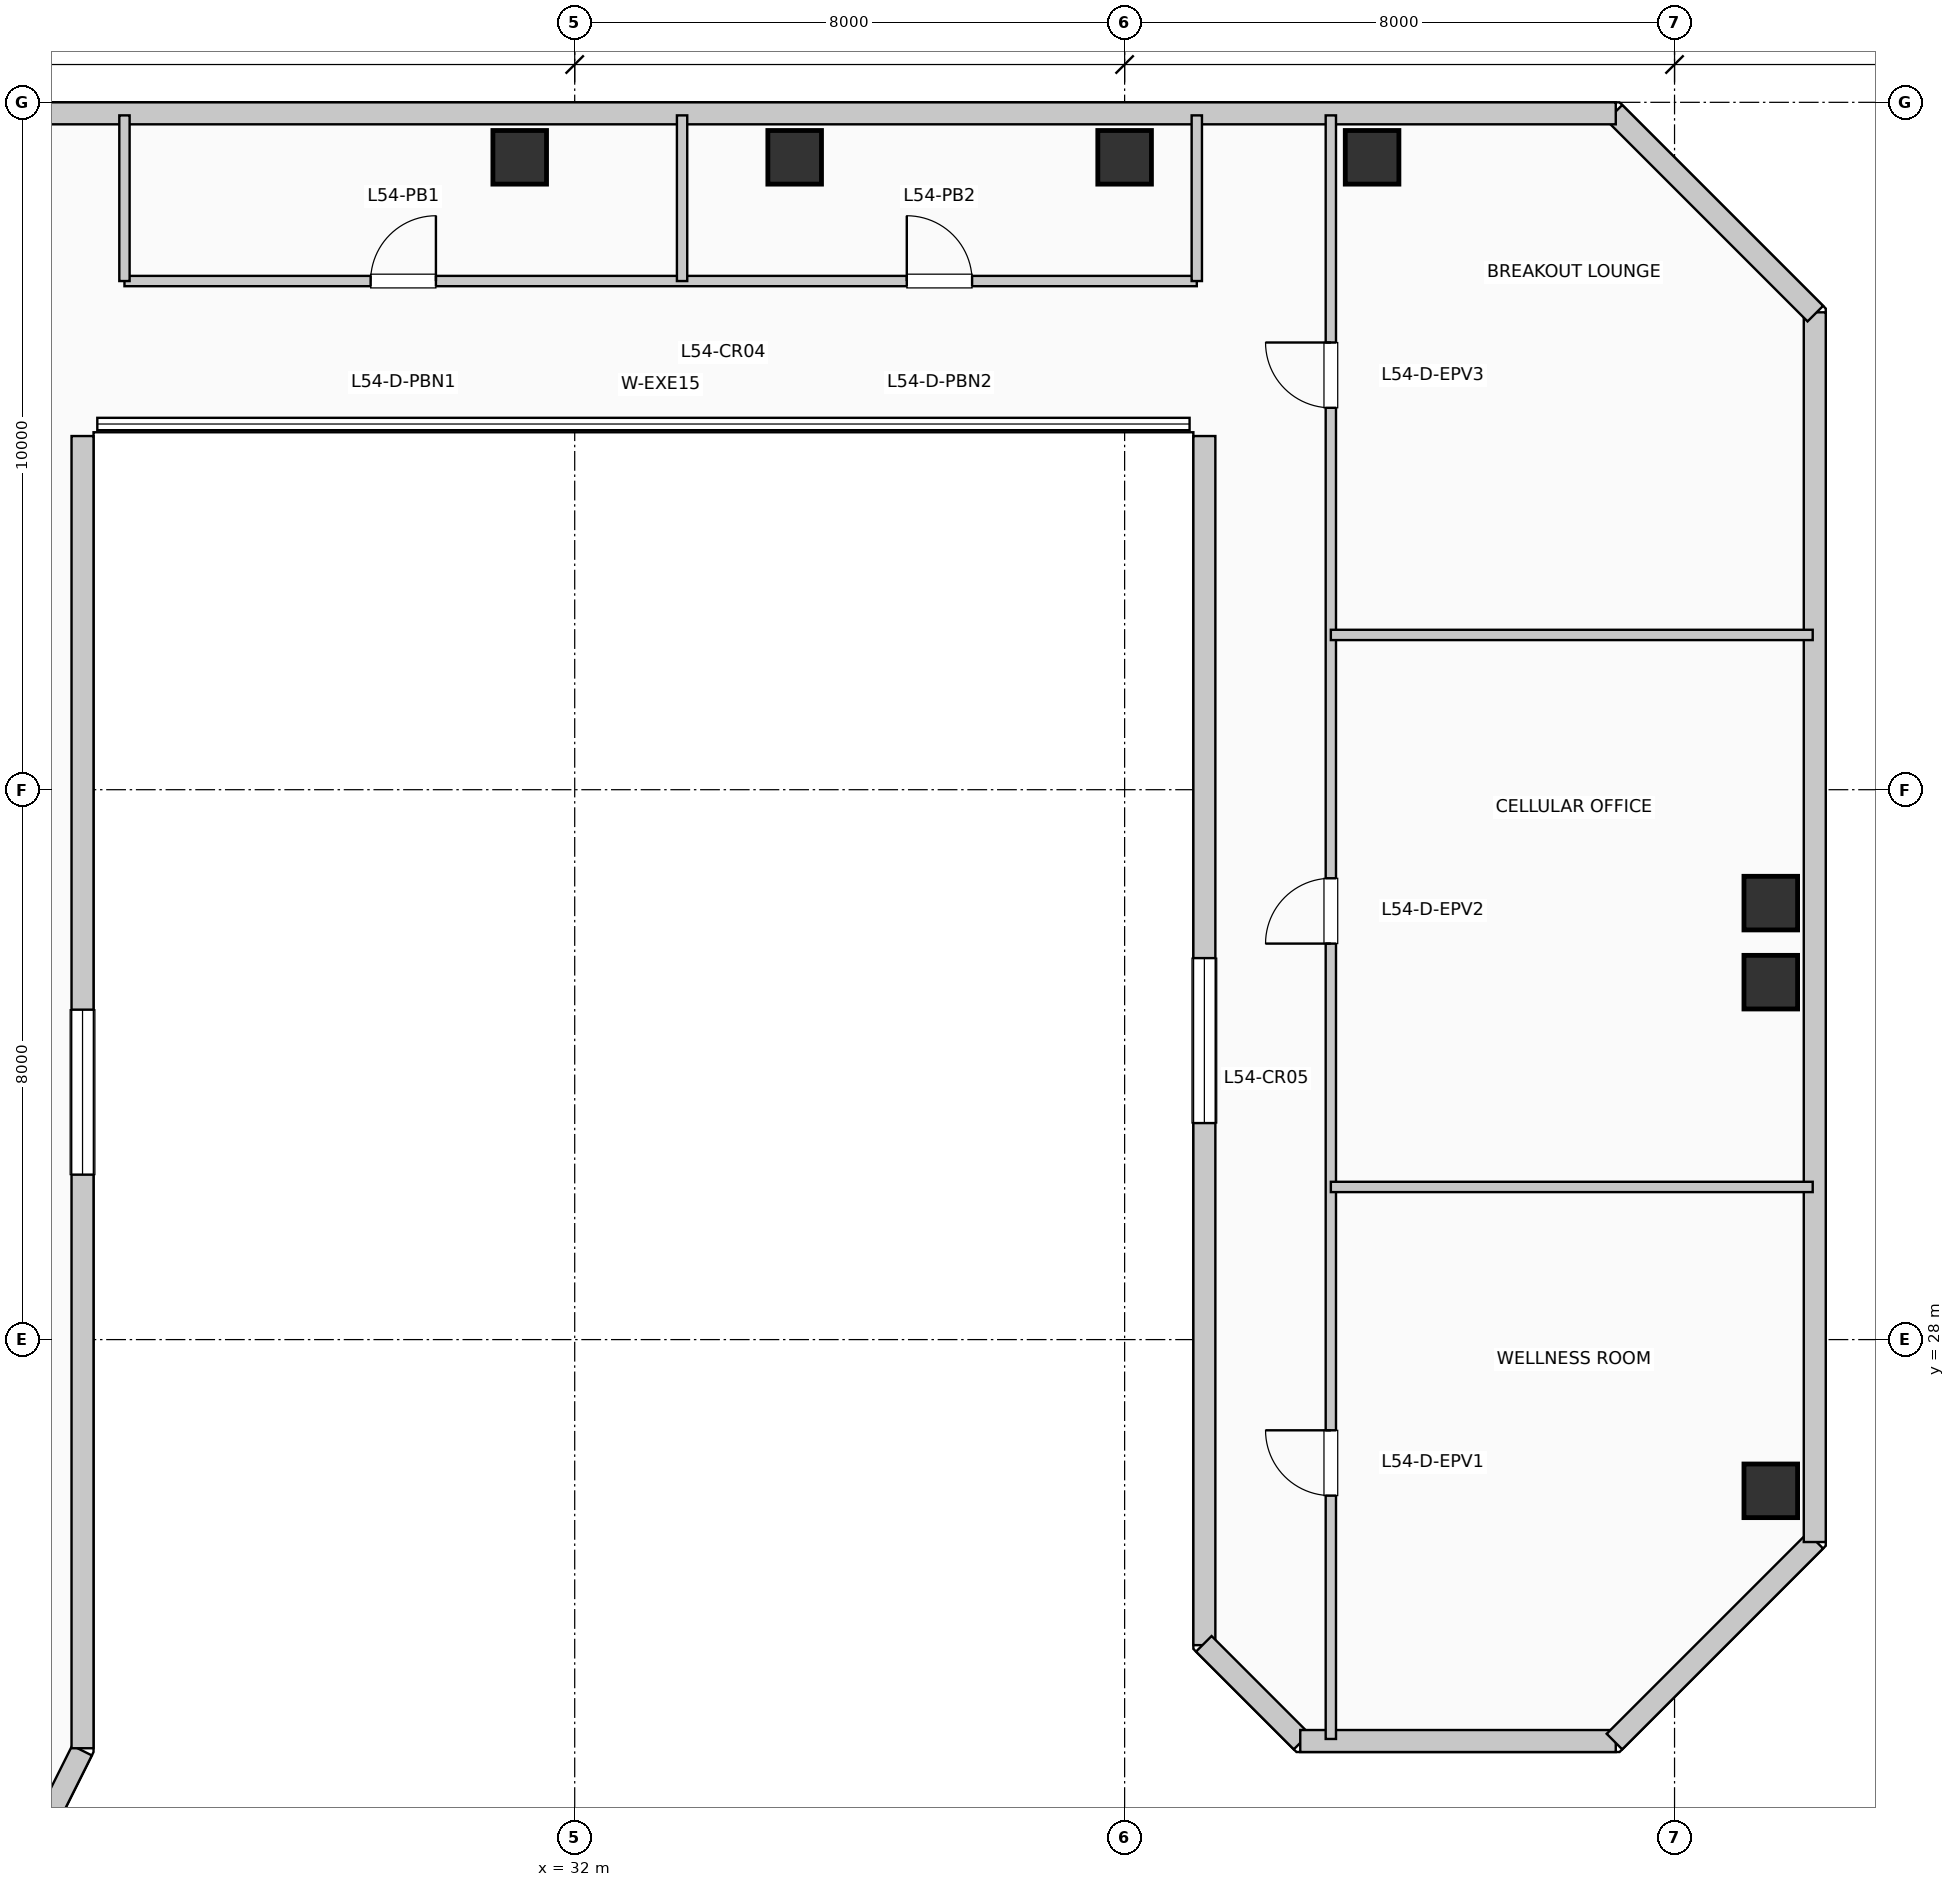
"""IFC4 building model, lengths in metres.
Left out: names, types, materials, properties, quantities, classifications, styles, units other than length and angle.
Written with IfcOpenShell. Run it as: python <this file> out.ifc"""

import sys

from ifc_helpers import new_model, si_unit, direction, frame, frame_2d, origin, origin_2d, place, context, subcontext, project, spatial, rectangle, extrude, element, fill, save


model = new_model("IFC4")
c1 = context("Model", 3, precision=1e-05, world=origin(), true_north=direction((0.0, 1.0)))
c2 = subcontext(c1, "Body", "Model", "MODEL_VIEW")
j1 = project(units=[si_unit("LENGTHUNIT", "METRE"), si_unit("PLANEANGLEUNIT", "RADIAN")], contexts=[c1])
p1 = place(None, origin())
s1 = spatial("IfcSite", under=j1, at=p1, CompositionType="ELEMENT")
p2 = place(p1, origin())
s2 = spatial("IfcBuilding", under=s1, at=p2, CompositionType="ELEMENT")
p3 = place(p2, frame((0.0, 0.0, 223.74)))
s3 = spatial("IfcBuildingStorey", under=s2, at=p3, CompositionType="ELEMENT", Elevation=223.74)
for number, where, z_axis, x_axis in (
    (1, (31.2, 45.2, 0.0), (0.0, 0.0, 1.0), (1.0, 0.0, 0.0)),
    (2, (35.2, 45.2, 0.0), (0.0, 0.0, 1.0), (1.0, 0.0, 0.0)),
    (3, (40.0, 45.2, 0.0), (0.0, 0.0, 1.0), (1.0, 0.0, 0.0)),
    (4, (43.6, 45.2, 0.0), (0.0, 0.0, 1.0), (1.0, 0.0, 0.0)),
    (5, (49.4, 25.8, 0.0), (0.0, 0.0, 1.0), (1.0, 0.0, 0.0)),
    (6, (49.4, 33.2, 0.0), (0.0, 0.0, 1.0), (1.0, 0.0, 0.0)),
    (7, (49.4, 34.35, 0.0), (0.0, 0.0, 1.0), (1.0, 0.0, 0.0)),
):
    element("IfcColumn", number, at=place(p3, frame(where, z_axis=z_axis, x_axis=x_axis)), inside=s3, PredefinedType="COLUMN", context=c2, shape_type="SweptSolid", body=[
        extrude(rectangle(XDim=0.78, YDim=0.78, at=origin_2d()), origin(), (0.0, 0.0, 1.0), 3.96),
    ])
p4 = place(p3, frame((23.882, 20.121, 0.0), z_axis=(0.0, 0.0, 1.0), x_axis=(0.447121734542, 0.894473115583, 0.0)))
e8 = element("IfcWall", 8, at=p4, inside=s3, PredefinedType="SOLIDWALL", context=c2, shape_type="SweptSolid", body=[
    extrude(rectangle(XDim=2.126, YDim=0.32, at=frame_2d((1.063, 0.0))), origin(), (0.0, 0.0, 1.0), 3.71),
])
p5 = place(p3, frame((24.84, 22.055, 0.0), z_axis=(0.0, 0.0, 1.0), x_axis=(0.0, 1.0, 0.0)))
e9 = element("IfcWall", 9, at=p5, inside=s3, PredefinedType="SOLIDWALL", context=c2, shape_type="SweptSolid", body=[
    extrude(rectangle(XDim=19.09, YDim=0.32, at=frame_2d((9.545, 0.0))), origin(), (0.0, 0.0, 1.0), 3.71),
])
p6 = place(p5, frame((8.345, 0.0, 0.85)))
e10 = element("IfcOpeningElement", 10, at=p6, cuts=e9, PredefinedType="OPENING", context=c2, shape_type="SweptSolid", body=[
    extrude(rectangle(XDim=2.4, YDim=2.05, at=frame_2d((1.2, 1.025))), frame((0.0, 0.17, 0.0), z_axis=(0.0, -1.0, 0.0), x_axis=(1.0, 0.0, 0.0)), (0.0, 0.0, 1.0), 0.34),
])
p7 = place(p3, frame((41.16, 41.145, 0.0), z_axis=(0.0, 0.0, 1.0), x_axis=(0.0, -1.0, 0.0)))
e11 = element("IfcWall", 11, at=p7, inside=s3, PredefinedType="SOLIDWALL", context=c2, shape_type="SweptSolid", body=[
    extrude(rectangle(XDim=17.59, YDim=0.32, at=frame_2d((8.795, 0.0))), origin(), (0.0, 0.0, 1.0), 3.71),
])
p8 = place(p7, frame((7.595, 0.0, 0.85)))
e12 = element("IfcOpeningElement", 12, at=p8, cuts=e11, PredefinedType="OPENING", context=c2, shape_type="SweptSolid", body=[
    extrude(rectangle(XDim=2.4, YDim=2.05, at=frame_2d((1.2, 1.025))), frame((0.0, 0.17, 0.0), z_axis=(0.0, -1.0, 0.0), x_axis=(1.0, 0.0, 0.0)), (0.0, 0.0, 1.0), 0.34),
])
p9 = place(p3, frame((41.152, 23.574, 0.0), z_axis=(0.0, 0.0, 1.0), x_axis=(0.707106781187, -0.707106781187, 0.0)))
e13 = element("IfcWall", 13, at=p9, inside=s3, PredefinedType="SOLIDWALL", context=c2, shape_type="SweptSolid", body=[
    extrude(rectangle(XDim=2.011, YDim=0.32, at=frame_2d((1.006, 0.0))), origin(), (0.0, 0.0, 1.0), 3.71),
])
p10 = place(p3, frame((42.555, 22.16, 0.0), z_axis=(0.0, 0.0, 1.0), x_axis=(1.0, 0.0, 0.0)))
e14 = element("IfcWall", 14, at=p10, inside=s3, PredefinedType="SOLIDWALL", context=c2, shape_type="SweptSolid", body=[
    extrude(rectangle(XDim=4.59, YDim=0.32, at=frame_2d((2.295, 0.0))), origin(), (0.0, 0.0, 1.0), 3.71),
])
p11 = place(p3, frame((47.126, 22.152, 0.0), z_axis=(0.0, 0.0, 1.0), x_axis=(0.707136318428, 0.707077242712, 0.0)))
e15 = element("IfcWall", 15, at=p11, inside=s3, PredefinedType="SOLIDWALL", context=c2, shape_type="SweptSolid", body=[
    extrude(rectangle(XDim=4.133, YDim=0.32, at=frame_2d((2.066, 0.0))), origin(), (0.0, 0.0, 1.0), 3.71),
])
p12 = place(p3, frame((50.04, 25.055, 0.0), z_axis=(0.0, 0.0, 1.0), x_axis=(0.0, 1.0, 0.0)))
e16 = element("IfcWall", 16, at=p12, inside=s3, PredefinedType="SOLIDWALL", context=c2, shape_type="SweptSolid", body=[
    extrude(rectangle(XDim=17.89, YDim=0.32, at=frame_2d((8.945, 0.0))), origin(), (0.0, 0.0, 1.0), 3.71),
])
p13 = place(p3, frame((50.048, 42.926, 0.0), z_axis=(0.0, 0.0, 1.0), x_axis=(-0.707136318428, 0.707077242712, 0.0)))
e17 = element("IfcWall", 17, at=p13, inside=s3, PredefinedType="SOLIDWALL", context=c2, shape_type="SweptSolid", body=[
    extrude(rectangle(XDim=4.133, YDim=0.32, at=frame_2d((2.066, 0.0))), origin(), (0.0, 0.0, 1.0), 3.71),
])
p14 = place(p3, frame((47.145, 45.84, 0.0), z_axis=(0.0, 0.0, 1.0), x_axis=(-1.0, 0.0, 0.0)))
e18 = element("IfcWall", 18, at=p14, inside=s3, PredefinedType="SOLIDWALL", context=c2, shape_type="SweptSolid", body=[
    extrude(rectangle(XDim=23.74, YDim=0.32, at=frame_2d((11.87, 0.0))), origin(), (0.0, 0.0, 1.0), 3.71),
])
p15 = place(p3, frame((25.45, 43.4, 0.0), z_axis=(0.0, 0.0, 1.0), x_axis=(1.0, 0.0, 0.0)))
e19 = element("IfcWall", 19, at=p15, inside=s3, PredefinedType="PARTITIONING", context=c2, shape_type="SweptSolid", body=[
    extrude(rectangle(XDim=15.6, YDim=0.15, at=frame_2d((7.8, 0.0))), origin(), (0.0, 0.0, 1.0), 3.71),
])
p16 = place(p15, frame((3.581, 0.0, 0.0)))
e20 = element("IfcOpeningElement", 20, at=p16, cuts=e19, PredefinedType="OPENING", context=c2, shape_type="SweptSolid", body=[
    extrude(rectangle(XDim=0.95, YDim=2.15, at=frame_2d((0.475, 1.075))), frame((0.0, 0.085, 0.0), z_axis=(0.0, -1.0, 0.0), x_axis=(1.0, 0.0, 0.0)), (0.0, 0.0, 1.0), 0.17),
])
p17 = place(p15, frame((11.381, 0.0, 0.0)))
e21 = element("IfcOpeningElement", 21, at=p17, cuts=e19, PredefinedType="OPENING", context=c2, shape_type="SweptSolid", body=[
    extrude(rectangle(XDim=0.95, YDim=2.15, at=frame_2d((0.475, 1.075))), frame((0.0, 0.085, 0.0), z_axis=(0.0, -1.0, 0.0), x_axis=(1.0, 0.0, 0.0)), (0.0, 0.0, 1.0), 0.17),
])
for number, where, z_axis, x_axis in (
    (22, (25.45, 43.4, 0.0), (0.0, 0.0, 1.0), (0.0, 1.0, 0.0)),
    (23, (41.05, 43.4, 0.0), (0.0, 0.0, 1.0), (0.0, 1.0, 0.0)),
    (24, (33.562, 43.4, 0.0), (0.0, 0.0, 1.0), (0.0, 1.0, 0.0)),
):
    element("IfcWall", number, at=place(p3, frame(where, z_axis=z_axis, x_axis=x_axis)), inside=s3, PredefinedType="PARTITIONING", context=c2, shape_type="SweptSolid", body=[
        extrude(rectangle(XDim=2.41, YDim=0.15, at=frame_2d((1.205, 0.0))), origin(), (0.0, 0.0, 1.0), 3.71),
    ])
p18 = place(p3, frame((43.0, 22.19, 0.0), z_axis=(0.0, 0.0, 1.0), x_axis=(0.0, 1.0, 0.0)))
e25 = element("IfcWall", 25, at=p18, inside=s3, PredefinedType="PARTITIONING", context=c2, shape_type="SweptSolid", body=[
    extrude(rectangle(XDim=23.62, YDim=0.15, at=frame_2d((11.81, 0.0))), origin(), (0.0, 0.0, 1.0), 3.71),
])
p19 = place(p18, frame((3.54, 0.0, 0.0)))
e26 = element("IfcOpeningElement", 26, at=p19, cuts=e25, PredefinedType="OPENING", context=c2, shape_type="SweptSolid", body=[
    extrude(rectangle(XDim=0.95, YDim=2.15, at=frame_2d((0.475, 1.075))), frame((0.0, 0.085, 0.0), z_axis=(0.0, -1.0, 0.0), x_axis=(1.0, 0.0, 0.0)), (0.0, 0.0, 1.0), 0.17),
])
p20 = place(p18, frame((11.571, 0.0, 0.0)))
e27 = element("IfcOpeningElement", 27, at=p20, cuts=e25, PredefinedType="OPENING", context=c2, shape_type="SweptSolid", body=[
    extrude(rectangle(XDim=0.95, YDim=2.15, at=frame_2d((0.475, 1.075))), frame((0.0, 0.085, 0.0), z_axis=(0.0, -1.0, 0.0), x_axis=(1.0, 0.0, 0.0)), (0.0, 0.0, 1.0), 0.17),
])
p21 = place(p18, frame((19.366, 0.0, 0.0)))
e28 = element("IfcOpeningElement", 28, at=p21, cuts=e25, PredefinedType="OPENING", context=c2, shape_type="SweptSolid", body=[
    extrude(rectangle(XDim=0.95, YDim=2.15, at=frame_2d((0.475, 1.075))), frame((0.0, 0.085, 0.0), z_axis=(0.0, -1.0, 0.0), x_axis=(1.0, 0.0, 0.0)), (0.0, 0.0, 1.0), 0.17),
])
for number, where, z_axis, x_axis in (
    (29, (43.0, 30.221, 0.0), (0.0, 0.0, 1.0), (1.0, 0.0, 0.0)),
    (30, (43.0, 38.252, 0.0), (0.0, 0.0, 1.0), (1.0, 0.0, 0.0)),
):
    element("IfcWall", number, at=place(p3, frame(where, z_axis=z_axis, x_axis=x_axis)), inside=s3, PredefinedType="PARTITIONING", context=c2, shape_type="SweptSolid", body=[
        extrude(rectangle(XDim=7.01, YDim=0.15, at=frame_2d((3.505, 0.0))), origin(), (0.0, 0.0, 1.0), 3.71),
    ])
p22 = place(p6, origin())
e31 = element("IfcWindow", 31, at=p22, inside=s3, PartitioningType="SINGLE_PANEL", PredefinedType="WINDOW", context=c2, shape_type="SweptSolid", body=[
    extrude(rectangle(XDim=2.4, YDim=2.05, at=frame_2d((1.2, 1.025))), frame((0.0, 0.03, 0.0), z_axis=(0.0, -1.0, 0.0), x_axis=(1.0, 0.0, 0.0)), (0.0, 0.0, 1.0), 0.06),
])
fill(e10, e31)
p23 = place(p8, origin())
e32 = element("IfcWindow", 32, at=p23, inside=s3, PartitioningType="SINGLE_PANEL", PredefinedType="WINDOW", context=c2, shape_type="SweptSolid", body=[
    extrude(rectangle(XDim=2.4, YDim=2.05, at=frame_2d((1.2, 1.025))), frame((0.0, 0.03, 0.0), z_axis=(0.0, -1.0, 0.0), x_axis=(1.0, 0.0, 0.0)), (0.0, 0.0, 1.0), 0.06),
])
fill(e12, e32)
p24 = place(p16, origin())
e33 = element("IfcDoor", 33, at=p24, inside=s3, OperationType="SINGLE_SWING_RIGHT", PredefinedType="DOOR", context=c2, shape_type="SweptSolid", body=[
    extrude(rectangle(XDim=0.95, YDim=2.15, at=frame_2d((0.475, 1.075))), frame((0.0, 0.025, 0.0), z_axis=(0.0, -1.0, 0.0), x_axis=(1.0, 0.0, 0.0)), (0.0, 0.0, 1.0), 0.05),
])
fill(e20, e33)
p25 = place(p17, origin())
e34 = element("IfcDoor", 34, at=p25, inside=s3, OperationType="SINGLE_SWING_LEFT", PredefinedType="DOOR", context=c2, shape_type="SweptSolid", body=[
    extrude(rectangle(XDim=0.95, YDim=2.15, at=frame_2d((0.475, 1.075))), frame((0.0, 0.025, 0.0), z_axis=(0.0, -1.0, 0.0), x_axis=(1.0, 0.0, 0.0)), (0.0, 0.0, 1.0), 0.05),
])
fill(e21, e34)
p26 = place(p19, origin())
e35 = element("IfcDoor", 35, at=p26, inside=s3, OperationType="SINGLE_SWING_RIGHT", PredefinedType="DOOR", context=c2, shape_type="SweptSolid", body=[
    extrude(rectangle(XDim=0.95, YDim=2.15, at=frame_2d((0.475, 1.075))), frame((0.0, 0.025, 0.0), z_axis=(0.0, -1.0, 0.0), x_axis=(1.0, 0.0, 0.0)), (0.0, 0.0, 1.0), 0.05),
])
fill(e26, e35)
p27 = place(p20, origin())
e36 = element("IfcDoor", 36, at=p27, inside=s3, OperationType="SINGLE_SWING_LEFT", PredefinedType="DOOR", context=c2, shape_type="SweptSolid", body=[
    extrude(rectangle(XDim=0.95, YDim=2.15, at=frame_2d((0.475, 1.075))), frame((0.0, 0.025, 0.0), z_axis=(0.0, -1.0, 0.0), x_axis=(1.0, 0.0, 0.0)), (0.0, 0.0, 1.0), 0.05),
])
fill(e27, e36)
p28 = place(p21, origin())
e37 = element("IfcDoor", 37, at=p28, inside=s3, OperationType="SINGLE_SWING_RIGHT", PredefinedType="DOOR", context=c2, shape_type="SweptSolid", body=[
    extrude(rectangle(XDim=0.95, YDim=2.15, at=frame_2d((0.475, 1.075))), frame((0.0, 0.025, 0.0), z_axis=(0.0, -1.0, 0.0), x_axis=(1.0, 0.0, 0.0)), (0.0, 0.0, 1.0), 0.05),
])
fill(e28, e37)
save(model, sys.argv[1])
